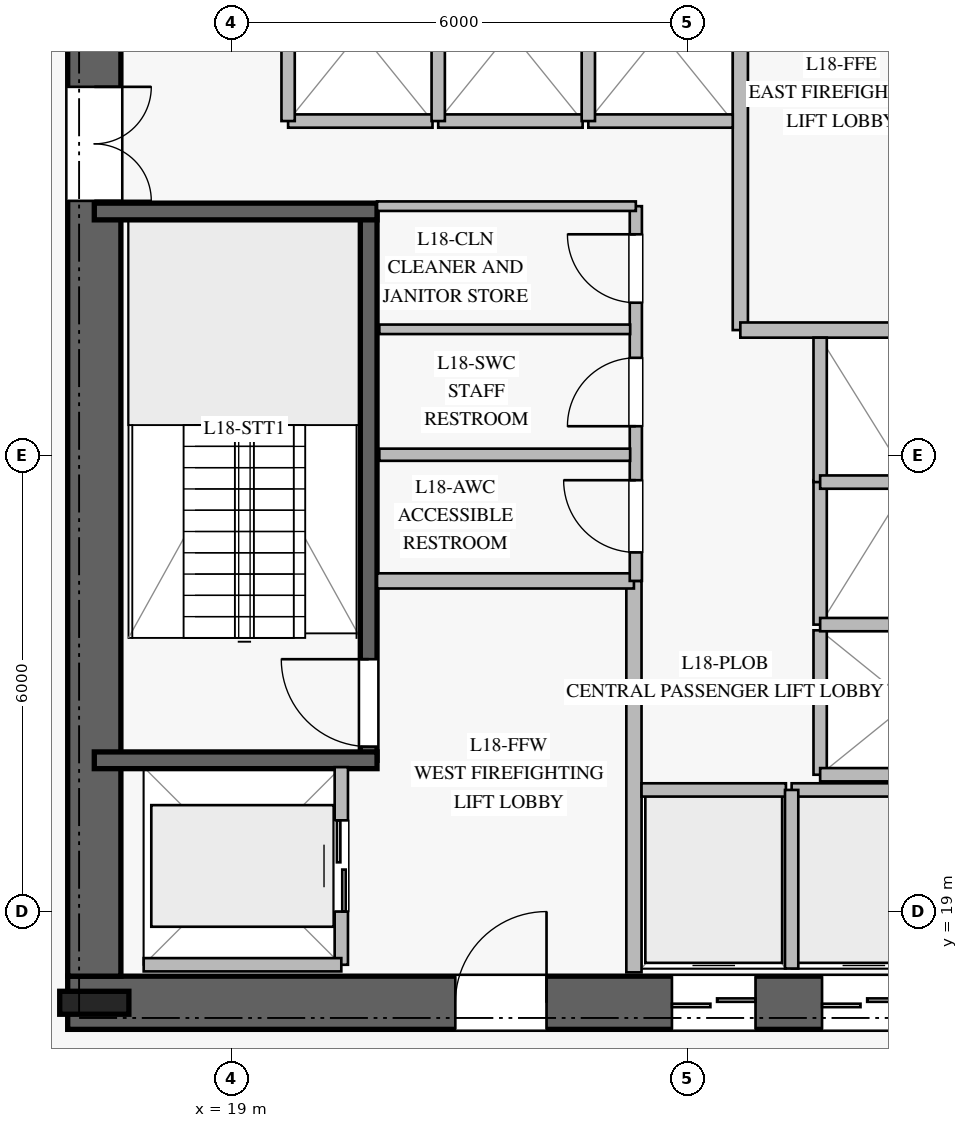
"""IFC4 building model, lengths in metres.
Left out: names, types, materials, properties, quantities, classifications, styles, units other than length and angle.
Written with IfcOpenShell. Run it as: python <this file> out.ifc"""

import sys

from ifc_helpers import new_model, si_unit, direction, frame, frame_2d, origin, origin_2d, place, context, subcontext, project, spatial, rectangle, i_section, extrude, element, fill, save


model = new_model("IFC4")
c1 = context("Model", 3, precision=1e-05, world=origin(), true_north=direction((0.0, 1.0)))
c2 = subcontext(c1, "Body", "Model", "MODEL_VIEW")
j1 = project(units=[si_unit("LENGTHUNIT", "METRE"), si_unit("PLANEANGLEUNIT", "RADIAN")], contexts=[c1])
p1 = place(None, origin())
s1 = spatial("IfcSite", under=j1, at=p1, CompositionType="ELEMENT")
p2 = place(p1, origin())
s2 = spatial("IfcBuilding", under=s1, at=p2, CompositionType="ELEMENT")
p3 = place(p2, frame((0.0, 0.0, 76.0)))
s3 = spatial("IfcBuildingStorey", under=s2, at=p3, CompositionType="ELEMENT", Elevation=76.0)
p4 = place(p3, frame((16.85, 17.8, 0.0), z_axis=(0.0, 0.0, 1.0), x_axis=(1.0, 0.0, 0.0)))
e1 = element("IfcWall", 1, at=p4, inside=s3, PredefinedType="SHEAR", context=c2, shape_type="SweptSolid", body=[
    extrude(rectangle(XDim=16.3, YDim=0.7, at=frame_2d((8.15, 0.0))), origin(), (0.0, 0.0, 1.0), 3.76),
])
p5 = place(p4, frame((5.1, 0.0, 0.0)))
e2 = element("IfcOpeningElement", 2, at=p5, cuts=e1, PredefinedType="OPENING", context=c2, shape_type="SweptSolid", body=[
    extrude(rectangle(XDim=1.2, YDim=2.25, at=frame_2d((0.6, 1.125))), frame((0.0, 0.36, 0.0), z_axis=(0.0, -1.0, 0.0), x_axis=(1.0, 0.0, 0.0)), (0.0, 0.0, 1.0), 0.72),
])
p6 = place(p4, frame((14.05, 0.0, 0.0)))
e3 = element("IfcOpeningElement", 3, at=p6, cuts=e1, PredefinedType="OPENING", context=c2, shape_type="SweptSolid", body=[
    extrude(rectangle(XDim=0.9, YDim=2.1, at=frame_2d((0.45, 1.05))), frame((0.0, 0.36, 0.0), z_axis=(0.0, -1.0, 0.0), x_axis=(1.0, 0.0, 0.0)), (0.0, 0.0, 1.0), 0.72),
])
p7 = place(p4, frame((7.95, 0.0, 0.0)))
e4 = element("IfcOpeningElement", 4, at=p7, cuts=e1, PredefinedType="OPENING", context=c2, shape_type="SweptSolid", body=[
    extrude(rectangle(XDim=1.1, YDim=2.2, at=frame_2d((0.55, 1.1))), frame((0.0, 0.36, 0.0), z_axis=(0.0, -1.0, 0.0), x_axis=(1.0, 0.0, 0.0)), (0.0, 0.0, 1.0), 0.72),
])
p8 = place(p4, frame((9.925, 0.0, 0.0)))
e5 = element("IfcOpeningElement", 5, at=p8, cuts=e1, PredefinedType="OPENING", context=c2, shape_type="SweptSolid", body=[
    extrude(rectangle(XDim=1.1, YDim=2.2, at=frame_2d((0.55, 1.1))), frame((0.0, 0.36, 0.0), z_axis=(0.0, -1.0, 0.0), x_axis=(1.0, 0.0, 0.0)), (0.0, 0.0, 1.0), 0.72),
])
p9 = place(p4, frame((11.9, 0.0, 0.0)))
e6 = element("IfcOpeningElement", 6, at=p9, cuts=e1, PredefinedType="OPENING", context=c2, shape_type="SweptSolid", body=[
    extrude(rectangle(XDim=1.1, YDim=2.2, at=frame_2d((0.55, 1.1))), frame((0.0, 0.36, 0.0), z_axis=(0.0, -1.0, 0.0), x_axis=(1.0, 0.0, 0.0)), (0.0, 0.0, 1.0), 0.72),
])
p10 = place(p3, frame((17.2, 31.85, 0.0), z_axis=(0.0, 0.0, 1.0), x_axis=(0.0, -1.0, 0.0)))
e7 = element("IfcWall", 7, at=p10, inside=s3, PredefinedType="SHEAR", context=c2, shape_type="SweptSolid", body=[
    extrude(rectangle(XDim=13.7, YDim=0.7, at=frame_2d((6.85, 0.0))), origin(), (0.0, 0.0, 1.0), 3.76),
])
p11 = place(p10, frame((2.0, 0.0, 0.0)))
e8 = element("IfcOpeningElement", 8, at=p11, cuts=e7, PredefinedType="OPENING", context=c2, shape_type="SweptSolid", body=[
    extrude(rectangle(XDim=1.5, YDim=2.2, at=frame_2d((0.75, 1.1))), frame((0.0, 0.36, 0.0), z_axis=(0.0, -1.0, 0.0), x_axis=(1.0, 0.0, 0.0)), (0.0, 0.0, 1.0), 0.72),
])
p12 = place(p3, frame((17.2, 17.8, 0.0), z_axis=(0.0, 0.0, 1.0), x_axis=(1.0, 0.0, 0.0)))
e9 = element("IfcColumn", 9, at=p12, inside=s3, PredefinedType="COLUMN", context=c2, shape_type="SweptSolid", body=[
    extrude(i_section(OverallWidth=0.302, OverallDepth=0.91, WebThickness=0.021, FlangeThickness=0.04, at=origin_2d()), origin(), (0.0, 0.0, 1.0), 4.0),
])
p13 = place(p3, frame((20.81, 20.99, 0.0), z_axis=(0.0, 0.0, 1.0), x_axis=(0.0, 1.0, 0.0)))
e10 = element("IfcWall", 10, at=p13, inside=s3, PredefinedType="SOLIDWALL", context=c2, shape_type="SweptSolid", body=[
    extrude(rectangle(XDim=7.22, YDim=0.22, at=frame_2d((3.61, 0.0))), origin(), (0.0, 0.0, 1.0), 3.76),
])
p14 = place(p13, frame((0.18, 0.0, 0.0)))
e11 = element("IfcOpeningElement", 11, at=p14, cuts=e10, PredefinedType="OPENING", context=c2, shape_type="SweptSolid", body=[
    extrude(rectangle(XDim=1.15, YDim=2.2, at=frame_2d((0.575, 1.1))), frame((0.0, 0.12, 0.0), z_axis=(0.0, -1.0, 0.0), x_axis=(1.0, 0.0, 0.0)), (0.0, 0.0, 1.0), 0.24),
])
for number, where, z_axis, x_axis in (
    (12, (17.2, 20.99, 0.0), (0.0, 0.0, 1.0), (1.0, 0.0, 0.0)),
    (13, (17.2, 28.21, 0.0), (0.0, 0.0, 1.0), (1.0, 0.0, 0.0)),
):
    element("IfcWall", number, at=place(p3, frame(where, z_axis=z_axis, x_axis=x_axis)), inside=s3, PredefinedType="SOLIDWALL", context=c2, shape_type="SweptSolid", body=[
        extrude(rectangle(XDim=3.72, YDim=0.22, at=frame_2d((1.86, 0.0))), origin(), (0.0, 0.0, 1.0), 3.76),
    ])
p15 = place(p3, frame((24.3, 18.2, 0.0), z_axis=(0.0, 0.0, 1.0), x_axis=(0.0, 1.0, 0.0)))
e14 = element("IfcWall", 14, at=p15, inside=s3, PredefinedType="PARTITIONING", context=c2, shape_type="SweptSolid", body=[
    extrude(rectangle(XDim=5.15, YDim=0.2, at=frame_2d((2.575, 0.0))), origin(), (0.0, 0.0, 1.0), 3.76),
])
p16 = place(p3, frame((20.92, 23.35, 0.0), z_axis=(0.0, 0.0, 1.0), x_axis=(1.0, 0.0, 0.0)))
e15 = element("IfcWall", 15, at=p16, inside=s3, PredefinedType="PARTITIONING", context=c2, shape_type="SweptSolid", body=[
    extrude(rectangle(XDim=3.38, YDim=0.2, at=frame_2d((1.69, 0.0))), origin(), (0.0, 0.0, 1.0), 3.76),
])
p17 = place(p3, frame((25.7, 26.65, 0.0), z_axis=(0.0, 0.0, 1.0), x_axis=(0.0, 1.0, 0.0)))
e16 = element("IfcWall", 16, at=p17, inside=s3, PredefinedType="PARTITIONING", context=c2, shape_type="SweptSolid", body=[
    extrude(rectangle(XDim=5.15, YDim=0.2, at=frame_2d((2.575, 0.0))), origin(), (0.0, 0.0, 1.0), 3.76),
])
p18 = place(p3, frame((25.7, 26.65, 0.0), z_axis=(0.0, 0.0, 1.0), x_axis=(1.0, 0.0, 0.0)))
e17 = element("IfcWall", 17, at=p18, inside=s3, PredefinedType="PARTITIONING", context=c2, shape_type="SweptSolid", body=[
    extrude(rectangle(XDim=3.38, YDim=0.2, at=frame_2d((1.69, 0.0))), origin(), (0.0, 0.0, 1.0), 3.76),
])
p19 = place(p3, frame((24.325, 23.35, 0.0), z_axis=(0.0, 0.0, 1.0), x_axis=(0.0, 1.0, 0.0)))
e18 = element("IfcWall", 18, at=p19, inside=s3, PredefinedType="PLUMBINGWALL", context=c2, shape_type="SweptSolid", body=[
    extrude(rectangle(XDim=4.93, YDim=0.16, at=frame_2d((2.465, 0.0))), origin(), (0.0, 0.0, 1.0), 3.76),
])
p20 = place(p19, frame((0.375, 0.0, 0.0)))
e19 = element("IfcOpeningElement", 19, at=p20, cuts=e18, PredefinedType="OPENING", context=c2, shape_type="SweptSolid", body=[
    extrude(rectangle(XDim=0.95, YDim=2.1, at=frame_2d((0.475, 1.05))), frame((0.0, 0.09, 0.0), z_axis=(0.0, -1.0, 0.0), x_axis=(1.0, 0.0, 0.0)), (0.0, 0.0, 1.0), 0.18),
])
p21 = place(p19, frame((2.035, 0.0, 0.0)))
e20 = element("IfcOpeningElement", 20, at=p21, cuts=e18, PredefinedType="OPENING", context=c2, shape_type="SweptSolid", body=[
    extrude(rectangle(XDim=0.9, YDim=2.1, at=frame_2d((0.45, 1.05))), frame((0.0, 0.09, 0.0), z_axis=(0.0, -1.0, 0.0), x_axis=(1.0, 0.0, 0.0)), (0.0, 0.0, 1.0), 0.18),
])
p22 = place(p19, frame((3.66, 0.0, 0.0)))
e21 = element("IfcOpeningElement", 21, at=p22, cuts=e18, PredefinedType="OPENING", context=c2, shape_type="SweptSolid", body=[
    extrude(rectangle(XDim=0.9, YDim=2.1, at=frame_2d((0.45, 1.05))), frame((0.0, 0.09, 0.0), z_axis=(0.0, -1.0, 0.0), x_axis=(1.0, 0.0, 0.0)), (0.0, 0.0, 1.0), 0.18),
])
p23 = place(p3, frame((20.92, 28.28, 0.0), z_axis=(0.0, 0.0, 1.0), x_axis=(1.0, 0.0, 0.0)))
e22 = element("IfcWall", 22, at=p23, inside=s3, PredefinedType="PARTITIONING", context=c2, shape_type="SweptSolid", body=[
    extrude(rectangle(XDim=3.405, YDim=0.125, at=frame_2d((1.703, 0.0))), origin(), (0.0, 0.0, 1.0), 3.76),
])
p24 = place(p3, frame((20.95, 25.01, 0.0), z_axis=(0.0, 0.0, 1.0), x_axis=(1.0, 0.0, 0.0)))
e23 = element("IfcWall", 23, at=p24, inside=s3, PredefinedType="PLUMBINGWALL", context=c2, shape_type="SweptSolid", body=[
    extrude(rectangle(XDim=3.3, YDim=0.16, at=frame_2d((1.65, 0.0))), origin(), (0.0, 0.0, 1.0), 3.76),
])
p25 = place(p3, frame((20.95, 26.66, 0.0), z_axis=(0.0, 0.0, 1.0), x_axis=(1.0, 0.0, 0.0)))
e24 = element("IfcWall", 24, at=p25, inside=s3, PredefinedType="PARTITIONING", context=c2, shape_type="SweptSolid", body=[
    extrude(rectangle(XDim=3.3, YDim=0.125, at=frame_2d((1.65, 0.0))), origin(), (0.0, 0.0, 1.0), 3.76),
])
p26 = place(p3, frame((24.4, 20.6, 0.0), z_axis=(0.0, 0.0, 1.0), x_axis=(1.0, 0.0, 0.0)))
e25 = element("IfcWall", 25, at=p26, inside=s3, PredefinedType="PARTITIONING", context=c2, shape_type="SweptSolid", body=[
    extrude(rectangle(XDim=1.9, YDim=0.175, at=frame_2d((0.95, 0.0))), origin(), (0.0, 0.0, 1.0), 3.76),
])
p27 = place(p3, frame((26.375, 20.6, 0.0), z_axis=(0.0, 0.0, 1.0), x_axis=(1.0, 0.0, 0.0)))
e26 = element("IfcWall", 26, at=p27, inside=s3, PredefinedType="PARTITIONING", context=c2, shape_type="SweptSolid", body=[
    extrude(rectangle(XDim=1.9, YDim=0.175, at=frame_2d((0.95, 0.0))), origin(), (0.0, 0.0, 1.0), 3.76),
])
p28 = place(p3, frame((26.375, 18.25, 0.0), z_axis=(0.0, 0.0, 1.0), x_axis=(0.0, 1.0, 0.0)))
e27 = element("IfcWall", 27, at=p28, inside=s3, PredefinedType="PARTITIONING", context=c2, shape_type="SweptSolid", body=[
    extrude(rectangle(XDim=2.35, YDim=0.175, at=frame_2d((1.175, 0.0))), origin(), (0.0, 0.0, 1.0), 3.76),
])
p29 = place(p3, frame((19.75, 29.4, 0.0), z_axis=(0.0, 0.0, 1.0), x_axis=(1.0, 0.0, 0.0)))
e28 = element("IfcWall", 28, at=p29, inside=s3, PredefinedType="PARTITIONING", context=c2, shape_type="SweptSolid", body=[
    extrude(rectangle(XDim=1.9, YDim=0.175, at=frame_2d((0.95, 0.0))), origin(), (0.0, 0.0, 1.0), 3.76),
])
p30 = place(p3, frame((19.75, 29.4, 0.0), z_axis=(0.0, 0.0, 1.0), x_axis=(0.0, 1.0, 0.0)))
e29 = element("IfcWall", 29, at=p30, inside=s3, PredefinedType="PARTITIONING", context=c2, shape_type="SweptSolid", body=[
    extrude(rectangle(XDim=2.35, YDim=0.175, at=frame_2d((1.175, 0.0))), origin(), (0.0, 0.0, 1.0), 3.76),
])
p31 = place(p3, frame((21.725, 29.4, 0.0), z_axis=(0.0, 0.0, 1.0), x_axis=(1.0, 0.0, 0.0)))
e30 = element("IfcWall", 30, at=p31, inside=s3, PredefinedType="PARTITIONING", context=c2, shape_type="SweptSolid", body=[
    extrude(rectangle(XDim=1.9, YDim=0.175, at=frame_2d((0.95, 0.0))), origin(), (0.0, 0.0, 1.0), 3.76),
])
p32 = place(p3, frame((21.725, 29.4, 0.0), z_axis=(0.0, 0.0, 1.0), x_axis=(0.0, 1.0, 0.0)))
e31 = element("IfcWall", 31, at=p32, inside=s3, PredefinedType="PARTITIONING", context=c2, shape_type="SweptSolid", body=[
    extrude(rectangle(XDim=2.35, YDim=0.175, at=frame_2d((1.175, 0.0))), origin(), (0.0, 0.0, 1.0), 3.76),
])
p33 = place(p3, frame((23.7, 29.4, 0.0), z_axis=(0.0, 0.0, 1.0), x_axis=(1.0, 0.0, 0.0)))
e32 = element("IfcWall", 32, at=p33, inside=s3, PredefinedType="PARTITIONING", context=c2, shape_type="SweptSolid", body=[
    extrude(rectangle(XDim=1.9, YDim=0.175, at=frame_2d((0.95, 0.0))), origin(), (0.0, 0.0, 1.0), 3.76),
])
p34 = place(p3, frame((23.7, 29.4, 0.0), z_axis=(0.0, 0.0, 1.0), x_axis=(0.0, 1.0, 0.0)))
e33 = element("IfcWall", 33, at=p34, inside=s3, PredefinedType="PARTITIONING", context=c2, shape_type="SweptSolid", body=[
    extrude(rectangle(XDim=2.35, YDim=0.175, at=frame_2d((1.175, 0.0))), origin(), (0.0, 0.0, 1.0), 3.76),
])
p35 = place(p3, frame((26.75, 20.8, 0.0), z_axis=(0.0, 0.0, 1.0), x_axis=(0.0, 1.0, 0.0)))
e34 = element("IfcWall", 34, at=p35, inside=s3, PredefinedType="PARTITIONING", context=c2, shape_type="SweptSolid", body=[
    extrude(rectangle(XDim=1.9, YDim=0.175, at=frame_2d((0.95, 0.0))), origin(), (0.0, 0.0, 1.0), 3.76),
])
p36 = place(p3, frame((26.75, 20.8, 0.0), z_axis=(0.0, 0.0, 1.0), x_axis=(1.0, 0.0, 0.0)))
e35 = element("IfcWall", 35, at=p36, inside=s3, PredefinedType="PARTITIONING", context=c2, shape_type="SweptSolid", body=[
    extrude(rectangle(XDim=2.35, YDim=0.175, at=frame_2d((1.175, 0.0))), origin(), (0.0, 0.0, 1.0), 3.76),
])
p37 = place(p3, frame((26.75, 22.775, 0.0), z_axis=(0.0, 0.0, 1.0), x_axis=(0.0, 1.0, 0.0)))
e36 = element("IfcWall", 36, at=p37, inside=s3, PredefinedType="PARTITIONING", context=c2, shape_type="SweptSolid", body=[
    extrude(rectangle(XDim=1.9, YDim=0.175, at=frame_2d((0.95, 0.0))), origin(), (0.0, 0.0, 1.0), 3.76),
])
p38 = place(p3, frame((26.75, 22.775, 0.0), z_axis=(0.0, 0.0, 1.0), x_axis=(1.0, 0.0, 0.0)))
e37 = element("IfcWall", 37, at=p38, inside=s3, PredefinedType="PARTITIONING", context=c2, shape_type="SweptSolid", body=[
    extrude(rectangle(XDim=2.35, YDim=0.175, at=frame_2d((1.175, 0.0))), origin(), (0.0, 0.0, 1.0), 3.76),
])
p39 = place(p3, frame((26.75, 24.65, 0.0), z_axis=(0.0, 0.0, 1.0), x_axis=(0.0, 1.0, 0.0)))
e38 = element("IfcWall", 38, at=p39, inside=s3, PredefinedType="PARTITIONING", context=c2, shape_type="SweptSolid", body=[
    extrude(rectangle(XDim=1.9, YDim=0.175, at=frame_2d((0.95, 0.0))), origin(), (0.0, 0.0, 1.0), 3.76),
])
p40 = place(p3, frame((26.75, 24.65, 0.0), z_axis=(0.0, 0.0, 1.0), x_axis=(1.0, 0.0, 0.0)))
e39 = element("IfcWall", 39, at=p40, inside=s3, PredefinedType="PARTITIONING", context=c2, shape_type="SweptSolid", body=[
    extrude(rectangle(XDim=2.35, YDim=0.175, at=frame_2d((1.175, 0.0))), origin(), (0.0, 0.0, 1.0), 3.76),
])
p41 = place(p3, frame((20.45, 18.3, 0.0), z_axis=(0.0, 0.0, 1.0), x_axis=(0.0, 1.0, 0.0)))
e40 = element("IfcWall", 40, at=p41, inside=s3, PredefinedType="PARTITIONING", context=c2, shape_type="SweptSolid", body=[
    extrude(rectangle(XDim=2.6, YDim=0.175, at=frame_2d((1.3, 0.0))), origin(), (0.0, 0.0, 1.0), 3.76),
])
p42 = place(p41, frame((0.7, 0.0, 0.0)))
e41 = element("IfcOpeningElement", 41, at=p42, cuts=e40, PredefinedType="OPENING", context=c2, shape_type="SweptSolid", body=[
    extrude(rectangle(XDim=1.2, YDim=2.2, at=frame_2d((0.6, 1.1))), frame((0.0, 0.098, 0.0), z_axis=(0.0, -1.0, 0.0), x_axis=(1.0, 0.0, 0.0)), (0.0, 0.0, 1.0), 0.195),
])
p43 = place(p3, frame((17.85, 18.3, 0.0), z_axis=(0.0, 0.0, 1.0), x_axis=(1.0, 0.0, 0.0)))
e42 = element("IfcWall", 42, at=p43, inside=s3, PredefinedType="PARTITIONING", context=c2, shape_type="SweptSolid", body=[
    extrude(rectangle(XDim=2.6, YDim=0.175, at=frame_2d((1.3, 0.0))), origin(), (0.0, 0.0, 1.0), 3.76),
])
p44 = place(p14, origin())
e43 = element("IfcDoor", 43, at=p44, inside=s3, OperationType="SINGLE_SWING_RIGHT", PredefinedType="DOOR", context=c2, shape_type="SweptSolid", body=[
    extrude(rectangle(XDim=1.15, YDim=2.2, at=frame_2d((0.575, 1.1))), frame((0.0, 0.025, 0.0), z_axis=(0.0, -1.0, 0.0), x_axis=(1.0, 0.0, 0.0)), (0.0, 0.0, 1.0), 0.05),
])
fill(e11, e43)
p45 = place(p5, origin())
e44 = element("IfcDoor", 44, at=p45, inside=s3, OperationType="SINGLE_SWING_RIGHT", PredefinedType="DOOR", context=c2, shape_type="SweptSolid", body=[
    extrude(rectangle(XDim=1.2, YDim=2.25, at=frame_2d((0.6, 1.125))), frame((0.0, 0.025, 0.0), z_axis=(0.0, -1.0, 0.0), x_axis=(1.0, 0.0, 0.0)), (0.0, 0.0, 1.0), 0.05),
])
fill(e2, e44)
p46 = place(p11, origin())
e45 = element("IfcDoor", 45, at=p46, inside=s3, OperationType="DOUBLE_DOOR_SINGLE_SWING", PredefinedType="DOOR", context=c2, shape_type="SweptSolid", body=[
    extrude(rectangle(XDim=1.5, YDim=2.2, at=frame_2d((0.75, 1.1))), frame((0.0, 0.025, 0.0), z_axis=(0.0, -1.0, 0.0), x_axis=(1.0, 0.0, 0.0)), (0.0, 0.0, 1.0), 0.05),
])
fill(e8, e45)
p47 = place(p20, origin())
e46 = element("IfcDoor", 46, at=p47, inside=s3, OperationType="SINGLE_SWING_RIGHT", PredefinedType="DOOR", context=c2, shape_type="SweptSolid", body=[
    extrude(rectangle(XDim=0.95, YDim=2.1, at=frame_2d((0.475, 1.05))), frame((0.0, 0.025, 0.0), z_axis=(0.0, -1.0, 0.0), x_axis=(1.0, 0.0, 0.0)), (0.0, 0.0, 1.0), 0.05),
])
fill(e19, e46)
p48 = place(p21, origin())
e47 = element("IfcDoor", 47, at=p48, inside=s3, OperationType="SINGLE_SWING_LEFT", PredefinedType="DOOR", context=c2, shape_type="SweptSolid", body=[
    extrude(rectangle(XDim=0.9, YDim=2.1, at=frame_2d((0.45, 1.05))), frame((0.0, 0.025, 0.0), z_axis=(0.0, -1.0, 0.0), x_axis=(1.0, 0.0, 0.0)), (0.0, 0.0, 1.0), 0.05),
])
fill(e20, e47)
p49 = place(p22, origin())
e48 = element("IfcDoor", 48, at=p49, inside=s3, OperationType="SINGLE_SWING_RIGHT", PredefinedType="DOOR", context=c2, shape_type="SweptSolid", body=[
    extrude(rectangle(XDim=0.9, YDim=2.1, at=frame_2d((0.45, 1.05))), frame((0.0, 0.025, 0.0), z_axis=(0.0, -1.0, 0.0), x_axis=(1.0, 0.0, 0.0)), (0.0, 0.0, 1.0), 0.05),
])
fill(e21, e48)
p50 = place(p7, origin())
e49 = element("IfcDoor", 49, at=p50, inside=s3, OperationType="DOUBLE_DOOR_SLIDING", PredefinedType="DOOR", context=c2, shape_type="SweptSolid", body=[
    extrude(rectangle(XDim=1.1, YDim=2.2, at=frame_2d((0.55, 1.1))), frame((0.0, 0.025, 0.0), z_axis=(0.0, -1.0, 0.0), x_axis=(1.0, 0.0, 0.0)), (0.0, 0.0, 1.0), 0.05),
])
fill(e4, e49)
p51 = place(p8, origin())
e50 = element("IfcDoor", 50, at=p51, inside=s3, OperationType="DOUBLE_DOOR_SLIDING", PredefinedType="DOOR", context=c2, shape_type="SweptSolid", body=[
    extrude(rectangle(XDim=1.1, YDim=2.2, at=frame_2d((0.55, 1.1))), frame((0.0, 0.025, 0.0), z_axis=(0.0, -1.0, 0.0), x_axis=(1.0, 0.0, 0.0)), (0.0, 0.0, 1.0), 0.05),
])
fill(e5, e50)
p52 = place(p42, origin())
e51 = element("IfcDoor", 51, at=p52, inside=s3, OperationType="DOUBLE_DOOR_SLIDING", PredefinedType="DOOR", context=c2, shape_type="SweptSolid", body=[
    extrude(rectangle(XDim=1.2, YDim=2.2, at=frame_2d((0.6, 1.1))), frame((0.0, 0.025, 0.0), z_axis=(0.0, -1.0, 0.0), x_axis=(1.0, 0.0, 0.0)), (0.0, 0.0, 1.0), 0.05),
])
fill(e41, e51)
save(model, sys.argv[1])
